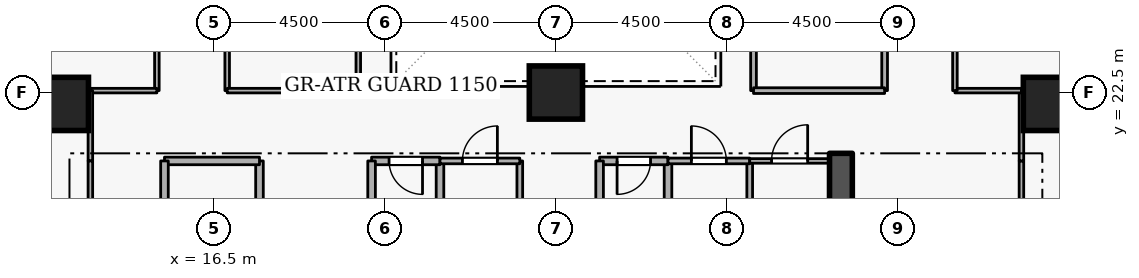
"""IFC4 building model, lengths in metres.
Left out: names, types, materials, properties, quantities, classifications, styles, units other than length and angle.
Written with IfcOpenShell. Run it as: python <this file> out.ifc"""

import sys

from ifc_helpers import new_model, si_unit, direction, frame, frame_2d, origin, origin_2d, place, context, subcontext, project, spatial, rectangle, extrude, element, fill, save


model = new_model("IFC4")
c1 = context("Model", 3, precision=1e-05, world=origin(), true_north=direction((0.0, 1.0)))
c2 = subcontext(c1, "Body", "Model", "MODEL_VIEW")
j1 = project(units=[si_unit("LENGTHUNIT", "METRE"), si_unit("PLANEANGLEUNIT", "RADIAN")], contexts=[c1])
p1 = place(None, origin())
s1 = spatial("IfcSite", under=j1, at=p1, CompositionType="ELEMENT")
p2 = place(p1, origin())
s2 = spatial("IfcBuilding", under=s1, at=p2, CompositionType="ELEMENT")
p3 = place(p2, frame((0.0, 0.0, 68.1)))
s3 = spatial("IfcBuildingStorey", under=s2, at=p3, CompositionType="ELEMENT", Elevation=68.1)
p4 = place(p3, frame((33.0, 15.2, 0.0), z_axis=(0.0, 0.0, 1.0), x_axis=(0.0, 1.0, 0.0)))
e1 = element("IfcWall", 1, at=p4, inside=s3, PredefinedType="SHEAR", context=c2, shape_type="SweptSolid", body=[
    extrude(rectangle(XDim=5.7, YDim=0.6, at=frame_2d((2.85, 0.0))), origin(), (0.0, 0.0, 1.0), 3.6),
])
for number, where, z_axis, x_axis in (
    (2, (12.5, 22.2, 0.0), (0.0, 0.0, 1.0), (1.0, 0.0, 0.0)),
    (3, (38.5, 22.2, 0.0), (0.0, 0.0, 1.0), (1.0, 0.0, 0.0)),
    (4, (25.5, 22.5, 0.0), (0.0, 0.0, 1.0), (1.0, 0.0, 0.0)),
):
    element("IfcColumn", number, at=place(p3, frame(where, z_axis=z_axis, x_axis=x_axis)), inside=s3, PredefinedType="COLUMN", context=c2, shape_type="SweptSolid", body=[
        extrude(rectangle(XDim=1.4, YDim=1.4, at=origin_2d()), origin(), (0.0, 0.0, 1.0), 3.6),
    ])
p5 = place(p3, frame((17.7, 18.4, 0.0), z_axis=(0.0, 0.0, 1.0), x_axis=(0.0, 1.0, 0.0)))
e5 = element("IfcWall", 5, at=p5, inside=s3, PredefinedType="STANDARD", context=c2, shape_type="SweptSolid", body=[
    extrude(rectangle(XDim=2.3, YDim=0.2, at=frame_2d((1.15, 0.0))), origin(), (0.0, 0.0, 1.0), 2.465),
])
p6 = place(p3, frame((17.7, 20.7, 0.0), z_axis=(0.0, 0.0, 1.0), x_axis=(-1.0, 0.0, 0.0)))
e6 = element("IfcWall", 6, at=p6, inside=s3, PredefinedType="STANDARD", context=c2, shape_type="SweptSolid", body=[
    extrude(rectangle(XDim=2.5, YDim=0.2, at=frame_2d((1.25, 0.0))), origin(), (0.0, 0.0, 1.0), 3.26),
])
p7 = place(p3, frame((15.2, 20.7, 0.0), z_axis=(0.0, 0.0, 1.0), x_axis=(0.0, -1.0, 0.0)))
e7 = element("IfcWall", 7, at=p7, inside=s3, PredefinedType="STANDARD", context=c2, shape_type="SweptSolid", body=[
    extrude(rectangle(XDim=5.7, YDim=0.2, at=frame_2d((2.85, 0.0))), origin(), (0.0, 0.0, 1.0), 3.26),
])
p8 = place(p7, frame((2.275, 0.0, 0.0)))
e8 = element("IfcOpeningElement", 8, at=p8, cuts=e7, PredefinedType="OPENING", context=c2, shape_type="SweptSolid", body=[
    extrude(rectangle(XDim=1.15, YDim=2.1, at=frame_2d((0.575, 1.05))), frame((0.0, 0.11, 0.0), z_axis=(0.0, -1.0, 0.0), x_axis=(1.0, 0.0, 0.0)), (0.0, 0.0, 1.0), 0.22),
])
p9 = place(p3, frame((28.45, 18.65, 0.0), z_axis=(0.0, 0.0, 1.0), x_axis=(0.0, 1.0, 0.0)))
e9 = element("IfcWall", 9, at=p9, inside=s3, PredefinedType="STANDARD", context=c2, shape_type="SweptSolid", body=[
    extrude(rectangle(XDim=2.05, YDim=0.2, at=frame_2d((1.025, 0.0))), origin(), (0.0, 0.0, 1.0), 3.26),
])
p10 = place(p3, frame((28.45, 20.7, 0.0), z_axis=(0.0, 0.0, 1.0), x_axis=(-1.0, 0.0, 0.0)))
e10 = element("IfcWall", 10, at=p10, inside=s3, PredefinedType="STANDARD", context=c2, shape_type="SweptSolid", body=[
    extrude(rectangle(XDim=1.8, YDim=0.2, at=frame_2d((0.9, 0.0))), origin(), (0.0, 0.0, 1.0), 3.26),
])
p11 = place(p10, frame((0.46, 0.0, 0.0)))
e11 = element("IfcOpeningElement", 11, at=p11, cuts=e10, PredefinedType="OPENING", context=c2, shape_type="SweptSolid", body=[
    extrude(rectangle(XDim=0.88, YDim=2.04, at=frame_2d((0.44, 1.02))), frame((0.0, 0.11, 0.0), z_axis=(0.0, -1.0, 0.0), x_axis=(1.0, 0.0, 0.0)), (0.0, 0.0, 1.0), 0.22),
])
for number, where, z_axis, x_axis in (
    (12, (26.65, 20.7, 0.0), (0.0, 0.0, 1.0), (0.0, -1.0, 0.0)),
    (13, (22.45, 18.65, 0.0), (0.0, 0.0, 1.0), (0.0, 1.0, 0.0)),
):
    element("IfcWall", number, at=place(p3, frame(where, z_axis=z_axis, x_axis=x_axis)), inside=s3, PredefinedType="STANDARD", context=c2, shape_type="SweptSolid", body=[
        extrude(rectangle(XDim=2.05, YDim=0.2, at=frame_2d((1.025, 0.0))), origin(), (0.0, 0.0, 1.0), 3.26),
    ])
p12 = place(p3, frame((22.45, 20.7, 0.0), z_axis=(0.0, 0.0, 1.0), x_axis=(-1.0, 0.0, 0.0)))
e14 = element("IfcWall", 14, at=p12, inside=s3, PredefinedType="STANDARD", context=c2, shape_type="SweptSolid", body=[
    extrude(rectangle(XDim=1.8, YDim=0.2, at=frame_2d((0.9, 0.0))), origin(), (0.0, 0.0, 1.0), 3.26),
])
p13 = place(p12, frame((0.46, 0.0, 0.0)))
e15 = element("IfcOpeningElement", 15, at=p13, cuts=e14, PredefinedType="OPENING", context=c2, shape_type="SweptSolid", body=[
    extrude(rectangle(XDim=0.88, YDim=2.04, at=frame_2d((0.44, 1.02))), frame((0.0, 0.11, 0.0), z_axis=(0.0, -1.0, 0.0), x_axis=(1.0, 0.0, 0.0)), (0.0, 0.0, 1.0), 0.22),
])
p14 = place(p3, frame((20.65, 20.7, 0.0), z_axis=(0.0, 0.0, 1.0), x_axis=(0.0, -1.0, 0.0)))
e16 = element("IfcWall", 16, at=p14, inside=s3, PredefinedType="STANDARD", context=c2, shape_type="SweptSolid", body=[
    extrude(rectangle(XDim=2.05, YDim=0.2, at=frame_2d((1.025, 0.0))), origin(), (0.0, 0.0, 1.0), 3.26),
])
p15 = place(p3, frame((24.55, 20.7, 0.0), z_axis=(0.0, 0.0, 1.0), x_axis=(0.0, -1.0, 0.0)))
e17 = element("IfcWall", 17, at=p15, inside=s3, PredefinedType="PARTITIONING", context=c2, shape_type="SweptSolid", body=[
    extrude(rectangle(XDim=2.05, YDim=0.15, at=frame_2d((1.025, 0.0))), origin(), (0.0, 0.0, 1.0), 3.26),
])
p16 = place(p3, frame((22.45, 20.7, 0.0), z_axis=(0.0, 0.0, 1.0), x_axis=(1.0, 0.0, 0.0)))
e18 = element("IfcWall", 18, at=p16, inside=s3, PredefinedType="PARTITIONING", context=c2, shape_type="SweptSolid", body=[
    extrude(rectangle(XDim=2.1, YDim=0.15, at=frame_2d((1.05, 0.0))), origin(), (0.0, 0.0, 1.0), 3.26),
])
p17 = place(p16, frame((0.59, 0.0, 0.0)))
e19 = element("IfcOpeningElement", 19, at=p17, cuts=e18, PredefinedType="OPENING", context=c2, shape_type="SweptSolid", body=[
    extrude(rectangle(XDim=0.92, YDim=2.08, at=frame_2d((0.46, 1.04))), frame((0.0, 0.085, 0.0), z_axis=(0.0, -1.0, 0.0), x_axis=(1.0, 0.0, 0.0)), (0.0, 0.0, 1.0), 0.17),
])
p18 = place(p3, frame((30.6, 20.7, 0.0), z_axis=(0.0, 0.0, 1.0), x_axis=(0.0, -1.0, 0.0)))
e20 = element("IfcWall", 20, at=p18, inside=s3, PredefinedType="PARTITIONING", context=c2, shape_type="SweptSolid", body=[
    extrude(rectangle(XDim=2.05, YDim=0.15, at=frame_2d((1.025, 0.0))), origin(), (0.0, 0.0, 1.0), 3.26),
])
p19 = place(p3, frame((28.45, 20.7, 0.0), z_axis=(0.0, 0.0, 1.0), x_axis=(1.0, 0.0, 0.0)))
e21 = element("IfcWall", 21, at=p19, inside=s3, PredefinedType="PARTITIONING", context=c2, shape_type="SweptSolid", body=[
    extrude(rectangle(XDim=2.15, YDim=0.15, at=frame_2d((1.075, 0.0))), origin(), (0.0, 0.0, 1.0), 3.26),
])
p20 = place(p19, frame((0.615, 0.0, 0.0)))
e22 = element("IfcOpeningElement", 22, at=p20, cuts=e21, PredefinedType="OPENING", context=c2, shape_type="SweptSolid", body=[
    extrude(rectangle(XDim=0.92, YDim=2.08, at=frame_2d((0.46, 1.04))), frame((0.0, 0.085, 0.0), z_axis=(0.0, -1.0, 0.0), x_axis=(1.0, 0.0, 0.0)), (0.0, 0.0, 1.0), 0.17),
])
p21 = place(p3, frame((30.6, 20.7, 0.0), z_axis=(0.0, 0.0, 1.0), x_axis=(1.0, 0.0, 0.0)))
e23 = element("IfcWall", 23, at=p21, inside=s3, PredefinedType="PARTITIONING", context=c2, shape_type="SweptSolid", body=[
    extrude(rectangle(XDim=2.1, YDim=0.12, at=frame_2d((1.05, 0.0))), origin(), (0.0, 0.0, 1.0), 3.26),
])
p22 = place(p21, frame((0.575, 0.0, 0.0)))
e24 = element("IfcOpeningElement", 24, at=p22, cuts=e23, PredefinedType="OPENING", context=c2, shape_type="SweptSolid", body=[
    extrude(rectangle(XDim=0.95, YDim=2.1, at=frame_2d((0.475, 1.05))), frame((0.0, 0.07, 0.0), z_axis=(0.0, -1.0, 0.0), x_axis=(1.0, 0.0, 0.0)), (0.0, 0.0, 1.0), 0.14),
])
p23 = place(p3, frame((15.0, 27.0, 0.0), z_axis=(0.0, 0.0, 1.0), x_axis=(0.0, -1.0, 0.0)))
e25 = element("IfcWall", 25, at=p23, inside=s3, PredefinedType="PARTITIONING", context=c2, shape_type="SweptSolid", body=[
    extrude(rectangle(XDim=4.45, YDim=0.12, at=frame_2d((2.225, 0.0))), origin(), (0.0, 0.0, 1.0), 3.26),
])
p24 = place(p3, frame((15.0, 22.55, 0.0), z_axis=(0.0, 0.0, 1.0), x_axis=(-1.0, 0.0, 0.0)))
e26 = element("IfcWall", 26, at=p24, inside=s3, PredefinedType="PARTITIONING", context=c2, shape_type="SweptSolid", body=[
    extrude(rectangle(XDim=1.75, YDim=0.12, at=frame_2d((0.875, 0.0))), origin(), (0.0, 0.0, 1.0), 3.26),
])
p25 = place(p3, frame((13.25, 22.55, 0.0), z_axis=(0.0, 0.0, 1.0), x_axis=(0.0, -1.0, 0.0)))
e27 = element("IfcWall", 27, at=p25, inside=s3, PredefinedType="PARTITIONING", context=c2, shape_type="SweptSolid", body=[
    extrude(rectangle(XDim=1.85, YDim=0.12, at=frame_2d((0.925, 0.0))), origin(), (0.0, 0.0, 1.0), 3.26),
])
p26 = place(p3, frame((13.25, 20.7, 0.0), z_axis=(0.0, 0.0, 1.0), x_axis=(0.0, -1.0, 0.0)))
e28 = element("IfcWall", 28, at=p26, inside=s3, PredefinedType="PARTITIONING", context=c2, shape_type="SweptSolid", body=[
    extrude(rectangle(XDim=9.35, YDim=0.12, at=frame_2d((4.675, 0.0))), origin(), (0.0, 0.0, 1.0), 3.26),
])
p27 = place(p26, frame((4.15, 0.0, 0.0)))
e29 = element("IfcOpeningElement", 29, at=p27, cuts=e28, PredefinedType="OPENING", context=c2, shape_type="SweptSolid", body=[
    extrude(rectangle(XDim=1.05, YDim=2.1, at=frame_2d((0.525, 1.05))), frame((0.0, 0.07, 0.0), z_axis=(0.0, -1.0, 0.0), x_axis=(1.0, 0.0, 0.0)), (0.0, 0.0, 1.0), 0.14),
])
p28 = place(p3, frame((37.75, 17.55, 0.0), z_axis=(0.0, 0.0, 1.0), x_axis=(0.0, 1.0, 0.0)))
e30 = element("IfcWall", 30, at=p28, inside=s3, PredefinedType="PARTITIONING", context=c2, shape_type="SweptSolid", body=[
    extrude(rectangle(XDim=3.15, YDim=0.12, at=frame_2d((1.575, 0.0))), origin(), (0.0, 0.0, 1.0), 3.26),
])
p29 = place(p3, frame((37.75, 20.7, 0.0), z_axis=(0.0, 0.0, 1.0), x_axis=(0.0, 1.0, 0.0)))
e31 = element("IfcWall", 31, at=p29, inside=s3, PredefinedType="PARTITIONING", context=c2, shape_type="SweptSolid", body=[
    extrude(rectangle(XDim=1.85, YDim=0.12, at=frame_2d((0.925, 0.0))), origin(), (0.0, 0.0, 1.0), 3.26),
])
p30 = place(p3, frame((37.75, 22.55, 0.0), z_axis=(0.0, 0.0, 1.0), x_axis=(-1.0, 0.0, 0.0)))
e32 = element("IfcWall", 32, at=p30, inside=s3, PredefinedType="PARTITIONING", context=c2, shape_type="SweptSolid", body=[
    extrude(rectangle(XDim=1.75, YDim=0.12, at=frame_2d((0.875, 0.0))), origin(), (0.0, 0.0, 1.0), 3.26),
])
p31 = place(p3, frame((36.0, 22.55, 0.0), z_axis=(0.0, 0.0, 1.0), x_axis=(0.0, 1.0, 0.0)))
e33 = element("IfcWall", 33, at=p31, inside=s3, PredefinedType="PARTITIONING", context=c2, shape_type="SweptSolid", body=[
    extrude(rectangle(XDim=4.45, YDim=0.12, at=frame_2d((2.225, 0.0))), origin(), (0.0, 0.0, 1.0), 3.26),
])
p32 = place(p31, frame((1.7, 0.0, 0.0)))
e34 = element("IfcOpeningElement", 34, at=p32, cuts=e33, PredefinedType="OPENING", context=c2, shape_type="SweptSolid", body=[
    extrude(rectangle(XDim=1.05, YDim=2.1, at=frame_2d((0.525, 1.05))), frame((0.0, 0.07, 0.0), z_axis=(0.0, -1.0, 0.0), x_axis=(1.0, 0.0, 0.0)), (0.0, 0.0, 1.0), 0.14),
])
p33 = place(p3, frame((30.7, 22.55, 0.0), z_axis=(0.0, 0.0, 1.0), x_axis=(0.0, 1.0, 0.0)))
e35 = element("IfcWall", 35, at=p33, inside=s3, PredefinedType="PARTITIONING", context=c2, shape_type="SweptSolid", body=[
    extrude(rectangle(XDim=8.9, YDim=0.15, at=frame_2d((4.45, 0.0))), origin(), (0.0, 0.0, 1.0), 3.26),
])
p34 = place(p3, frame((34.15, 31.45, 0.0), z_axis=(0.0, 0.0, 1.0), x_axis=(0.0, -1.0, 0.0)))
e36 = element("IfcWall", 36, at=p34, inside=s3, PredefinedType="PARTITIONING", context=c2, shape_type="SweptSolid", body=[
    extrude(rectangle(XDim=8.9, YDim=0.15, at=frame_2d((4.45, 0.0))), origin(), (0.0, 0.0, 1.0), 3.26),
])
p35 = place(p34, frame((3.8, 0.0, 0.0)))
e37 = element("IfcOpeningElement", 37, at=p35, cuts=e36, PredefinedType="OPENING", context=c2, shape_type="SweptSolid", body=[
    extrude(rectangle(XDim=1.3, YDim=2.12, at=frame_2d((0.65, 1.06))), frame((0.0, 0.085, 0.0), z_axis=(0.0, -1.0, 0.0), x_axis=(1.0, 0.0, 0.0)), (0.0, 0.0, 1.0), 0.17),
])
p36 = place(p3, frame((34.15, 22.55, 0.0), z_axis=(0.0, 0.0, 1.0), x_axis=(-1.0, 0.0, 0.0)))
e38 = element("IfcWall", 38, at=p36, inside=s3, PredefinedType="PARTITIONING", context=c2, shape_type="SweptSolid", body=[
    extrude(rectangle(XDim=3.45, YDim=0.15, at=frame_2d((1.725, 0.0))), origin(), (0.0, 0.0, 1.0), 3.26),
])
p37 = place(p3, frame((16.85, 22.55, 0.0), z_axis=(0.0, 0.0, 1.0), x_axis=(0.0, 1.0, 0.0)))
e39 = element("IfcWall", 39, at=p37, inside=s3, PredefinedType="PARTITIONING", context=c2, shape_type="SweptSolid", body=[
    extrude(rectangle(XDim=8.9, YDim=0.12, at=frame_2d((4.45, 0.0))), origin(), (0.0, 0.0, 1.0), 3.26),
])
p38 = place(p37, frame((3.975, 0.0, 0.0)))
e40 = element("IfcOpeningElement", 40, at=p38, cuts=e39, PredefinedType="OPENING", context=c2, shape_type="SweptSolid", body=[
    extrude(rectangle(XDim=0.95, YDim=2.1, at=frame_2d((0.475, 1.05))), frame((0.0, 0.07, 0.0), z_axis=(0.0, -1.0, 0.0), x_axis=(1.0, 0.0, 0.0)), (0.0, 0.0, 1.0), 0.14),
])
p39 = place(p3, frame((20.3, 31.45, 0.0), z_axis=(0.0, 0.0, 1.0), x_axis=(0.0, -1.0, 0.0)))
e41 = element("IfcWall", 41, at=p39, inside=s3, PredefinedType="PARTITIONING", context=c2, shape_type="SweptSolid", body=[
    extrude(rectangle(XDim=8.9, YDim=0.12, at=frame_2d((4.45, 0.0))), origin(), (0.0, 0.0, 1.0), 3.26),
])
p40 = place(p3, frame((20.3, 22.55, 0.0), z_axis=(0.0, 0.0, 1.0), x_axis=(-1.0, 0.0, 0.0)))
e42 = element("IfcWall", 42, at=p40, inside=s3, PredefinedType="PARTITIONING", context=c2, shape_type="SweptSolid", body=[
    extrude(rectangle(XDim=3.45, YDim=0.12, at=frame_2d((1.725, 0.0))), origin(), (0.0, 0.0, 1.0), 3.26),
])
p41 = place(p11, origin())
e43 = element("IfcDoor", 43, at=p41, inside=s3, OperationType="SINGLE_SWING_RIGHT", PredefinedType="DOOR", context=c2, shape_type="SweptSolid", body=[
    extrude(rectangle(XDim=0.88, YDim=2.04, at=frame_2d((0.44, 1.02))), frame((0.0, 0.025, 0.0), z_axis=(0.0, -1.0, 0.0), x_axis=(1.0, 0.0, 0.0)), (0.0, 0.0, 1.0), 0.05),
])
fill(e11, e43)
p42 = place(p13, origin())
e44 = element("IfcDoor", 44, at=p42, inside=s3, OperationType="SINGLE_SWING_LEFT", PredefinedType="DOOR", context=c2, shape_type="SweptSolid", body=[
    extrude(rectangle(XDim=0.88, YDim=2.04, at=frame_2d((0.44, 1.02))), frame((0.0, 0.025, 0.0), z_axis=(0.0, -1.0, 0.0), x_axis=(1.0, 0.0, 0.0)), (0.0, 0.0, 1.0), 0.05),
])
fill(e15, e44)
p43 = place(p17, origin())
e45 = element("IfcDoor", 45, at=p43, inside=s3, OperationType="SINGLE_SWING_RIGHT", PredefinedType="DOOR", context=c2, shape_type="SweptSolid", body=[
    extrude(rectangle(XDim=0.92, YDim=2.08, at=frame_2d((0.46, 1.04))), frame((0.0, 0.025, 0.0), z_axis=(0.0, -1.0, 0.0), x_axis=(1.0, 0.0, 0.0)), (0.0, 0.0, 1.0), 0.05),
])
fill(e19, e45)
p44 = place(p20, origin())
e46 = element("IfcDoor", 46, at=p44, inside=s3, OperationType="SINGLE_SWING_LEFT", PredefinedType="DOOR", context=c2, shape_type="SweptSolid", body=[
    extrude(rectangle(XDim=0.92, YDim=2.08, at=frame_2d((0.46, 1.04))), frame((0.0, 0.025, 0.0), z_axis=(0.0, -1.0, 0.0), x_axis=(1.0, 0.0, 0.0)), (0.0, 0.0, 1.0), 0.05),
])
fill(e22, e46)
p45 = place(p22, origin())
e47 = element("IfcDoor", 47, at=p45, inside=s3, OperationType="SINGLE_SWING_RIGHT", PredefinedType="DOOR", context=c2, shape_type="SweptSolid", body=[
    extrude(rectangle(XDim=0.95, YDim=2.1, at=frame_2d((0.475, 1.05))), frame((0.0, 0.025, 0.0), z_axis=(0.0, -1.0, 0.0), x_axis=(1.0, 0.0, 0.0)), (0.0, 0.0, 1.0), 0.05),
])
fill(e24, e47)
save(model, sys.argv[1])
